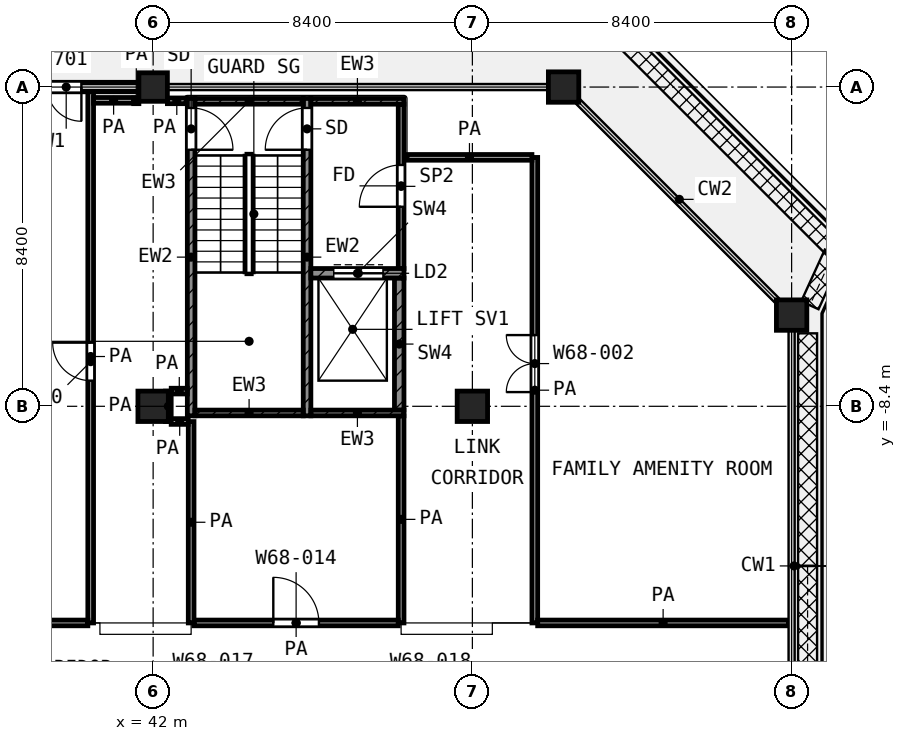
"""IFC4 building model, lengths in metres.
Left out: names, types, materials, properties, quantities, classifications, styles, units other than length and angle.
Written with IfcOpenShell. Run it as: python <this file> out.ifc"""

import sys

from ifc_helpers import new_model, si_unit, direction, frame, frame_2d, origin, origin_2d, place, context, subcontext, project, spatial, rectangle, extrude, element, fill, save


model = new_model("IFC4")
c1 = context("Model", 3, precision=1e-05, world=origin(), true_north=direction((0.0, 1.0)))
c2 = subcontext(c1, "Body", "Model", "MODEL_VIEW")
j1 = project(units=[si_unit("LENGTHUNIT", "METRE"), si_unit("PLANEANGLEUNIT", "RADIAN")], contexts=[c1])
p1 = place(None, origin())
s1 = spatial("IfcSite", under=j1, at=p1, CompositionType="ELEMENT")
p2 = place(p1, origin())
s2 = spatial("IfcBuilding", under=s1, at=p2, CompositionType="ELEMENT")
p3 = place(p2, frame((0.0, 0.0, 315.4)))
s3 = spatial("IfcBuildingStorey", under=s2, at=p3, CompositionType="ELEMENT", Elevation=315.4)
p4 = place(p3, frame((42.0, 0.0, 0.0), z_axis=(0.0, 0.0, 1.0), x_axis=(1.0, 0.0, 0.0)))
e1 = element("IfcColumn", 1, at=p4, inside=s3, PredefinedType="COLUMN", context=c2, shape_type="SweptSolid", body=[
    extrude(rectangle(XDim=0.75, YDim=0.75, at=origin_2d()), origin(), (0.0, 0.0, 1.0), 4.2),
])
for number, where, z_axis, x_axis in (
    (2, (52.8, 0.0, 0.0), (0.0, 0.0, 1.0), (1.0, 0.0, 0.0)),
    (3, (58.8, -6.0, 0.0), (0.0, 0.0, 1.0), (1.0, 0.0, 0.0)),
    (4, (42.0, -8.4, 0.0), (0.0, 0.0, 1.0), (1.0, 0.0, 0.0)),
    (5, (50.4, -8.4, 0.0), (0.0, 0.0, 1.0), (1.0, 0.0, 0.0)),
):
    element("IfcColumn", number, at=place(p3, frame(where, z_axis=z_axis, x_axis=x_axis)), inside=s3, PredefinedType="COLUMN", context=c2, shape_type="SweptSolid", body=[
        extrude(rectangle(XDim=0.8, YDim=0.8, at=origin_2d()), origin(), (0.0, 0.0, 1.0), 4.2),
    ])
p5 = place(p3, frame((41.625, 0.0, 0.0), z_axis=(0.0, 0.0, 1.0), x_axis=(-1.0, 0.0, 0.0)))
e6 = element("IfcWall", 6, at=p5, inside=s3, PredefinedType="SOLIDWALL", context=c2, shape_type="SweptSolid", body=[
    extrude(rectangle(XDim=3.825, YDim=0.25, at=frame_2d((1.913, 0.0))), origin(), (0.0, 0.0, 1.0), 3.48),
])
p6 = place(p5, frame((1.512, 0.0, 0.0)))
e7 = element("IfcOpeningElement", 7, at=p6, cuts=e6, PredefinedType="OPENING", context=c2, shape_type="SweptSolid", body=[
    extrude(rectangle(XDim=1.8, YDim=2.1, at=frame_2d((0.9, 1.05))), frame((0.0, 0.135, 0.0), z_axis=(0.0, -1.0, 0.0), x_axis=(1.0, 0.0, 0.0)), (0.0, 0.0, 1.0), 0.27),
])
p7 = place(p3, frame((43.0, -8.65, 0.0), z_axis=(0.0, 0.0, 1.0), x_axis=(0.0, 1.0, 0.0)))
e8 = element("IfcWall", 8, at=p7, inside=s3, PredefinedType="SHEAR", context=c2, shape_type="SweptSolid", body=[
    extrude(rectangle(XDim=8.35, YDim=0.2, at=frame_2d((4.175, 0.0))), origin(), (0.0, 0.0, 1.0), 3.6),
])
p8 = place(p7, frame((7.0, 0.0, 0.0)))
e9 = element("IfcOpeningElement", 9, at=p8, cuts=e8, PredefinedType="OPENING", context=c2, shape_type="SweptSolid", body=[
    extrude(rectangle(XDim=1.1, YDim=2.1, at=frame_2d((0.55, 1.05))), frame((0.0, 0.11, 0.0), z_axis=(0.0, -1.0, 0.0), x_axis=(1.0, 0.0, 0.0)), (0.0, 0.0, 1.0), 0.22),
])
p9 = place(p3, frame((46.05, -8.65, 0.0), z_axis=(0.0, 0.0, 1.0), x_axis=(0.0, 1.0, 0.0)))
e10 = element("IfcWall", 10, at=p9, inside=s3, PredefinedType="SHEAR", context=c2, shape_type="SweptSolid", body=[
    extrude(rectangle(XDim=8.35, YDim=0.2, at=frame_2d((4.175, 0.0))), origin(), (0.0, 0.0, 1.0), 3.6),
])
p10 = place(p9, frame((7.0, 0.0, 0.0)))
e11 = element("IfcOpeningElement", 11, at=p10, cuts=e10, PredefinedType="OPENING", context=c2, shape_type="SweptSolid", body=[
    extrude(rectangle(XDim=1.1, YDim=2.1, at=frame_2d((0.55, 1.05))), frame((0.0, 0.11, 0.0), z_axis=(0.0, -1.0, 0.0), x_axis=(1.0, 0.0, 0.0)), (0.0, 0.0, 1.0), 0.22),
])
p11 = place(p3, frame((43.1, -0.375, 0.0), z_axis=(0.0, 0.0, 1.0), x_axis=(1.0, 0.0, 0.0)))
e12 = element("IfcWall", 12, at=p11, inside=s3, PredefinedType="SHEAR", context=c2, shape_type="SweptSolid", body=[
    extrude(rectangle(XDim=2.85, YDim=0.15, at=frame_2d((1.425, 0.0))), origin(), (0.0, 0.0, 1.0), 3.6),
])
p12 = place(p3, frame((46.15, -0.375, 0.0), z_axis=(0.0, 0.0, 1.0), x_axis=(1.0, 0.0, 0.0)))
e13 = element("IfcWall", 13, at=p12, inside=s3, PredefinedType="SHEAR", context=c2, shape_type="SweptSolid", body=[
    extrude(rectangle(XDim=2.45, YDim=0.15, at=frame_2d((1.225, 0.0))), origin(), (0.0, 0.0, 1.0), 3.6),
])
p13 = place(p3, frame((43.1, -8.575, 0.0), z_axis=(0.0, 0.0, 1.0), x_axis=(1.0, 0.0, 0.0)))
e14 = element("IfcWall", 14, at=p13, inside=s3, PredefinedType="SHEAR", context=c2, shape_type="SweptSolid", body=[
    extrude(rectangle(XDim=2.85, YDim=0.15, at=frame_2d((1.425, 0.0))), origin(), (0.0, 0.0, 1.0), 3.6),
])
p14 = place(p3, frame((46.15, -8.575, 0.0), z_axis=(0.0, 0.0, 1.0), x_axis=(1.0, 0.0, 0.0)))
e15 = element("IfcWall", 15, at=p14, inside=s3, PredefinedType="SHEAR", context=c2, shape_type="SweptSolid", body=[
    extrude(rectangle(XDim=2.45, YDim=0.15, at=frame_2d((1.225, 0.0))), origin(), (0.0, 0.0, 1.0), 3.6),
])
p15 = place(p3, frame((46.15, -4.9, 0.0), z_axis=(0.0, 0.0, 1.0), x_axis=(1.0, 0.0, 0.0)))
e16 = element("IfcWall", 16, at=p15, inside=s3, PredefinedType="SHEAR", context=c2, shape_type="SweptSolid", body=[
    extrude(rectangle(XDim=2.45, YDim=0.25, at=frame_2d((1.225, 0.0))), origin(), (0.0, 0.0, 1.0), 3.6),
])
p16 = place(p15, frame((0.6, 0.0, 0.0)))
e17 = element("IfcOpeningElement", 17, at=p16, cuts=e16, PredefinedType="OPENING", context=c2, shape_type="SweptSolid", body=[
    extrude(rectangle(XDim=1.3, YDim=2.1, at=frame_2d((0.65, 1.05))), frame((0.0, 0.135, 0.0), z_axis=(0.0, -1.0, 0.0), x_axis=(1.0, 0.0, 0.0)), (0.0, 0.0, 1.0), 0.27),
])
p17 = place(p3, frame((48.475, -8.5, 0.0), z_axis=(0.0, 0.0, 1.0), x_axis=(0.0, 1.0, 0.0)))
e18 = element("IfcWall", 18, at=p17, inside=s3, PredefinedType="SHEAR", context=c2, shape_type="SweptSolid", body=[
    extrude(rectangle(XDim=3.475, YDim=0.25, at=frame_2d((1.738, 0.0))), origin(), (0.0, 0.0, 1.0), 3.6),
])
p18 = place(p3, frame((48.525, -4.775, 0.0), z_axis=(0.0, 0.0, 1.0), x_axis=(0.0, 1.0, 0.0)))
e19 = element("IfcWall", 19, at=p18, inside=s3, PredefinedType="PARTITIONING", context=c2, shape_type="SweptSolid", body=[
    extrude(rectangle(XDim=4.325, YDim=0.15, at=frame_2d((2.163, 0.0))), origin(), (0.0, 0.0, 1.0), 3.6),
])
p19 = place(p18, frame((1.625, 0.0, 0.0)))
e20 = element("IfcOpeningElement", 20, at=p19, cuts=e19, PredefinedType="OPENING", context=c2, shape_type="SweptSolid", body=[
    extrude(rectangle(XDim=1.1, YDim=2.1, at=frame_2d((0.55, 1.05))), frame((0.0, 0.085, 0.0), z_axis=(0.0, -1.0, 0.0), x_axis=(1.0, 0.0, 0.0)), (0.0, 0.0, 1.0), 0.17),
])
p20 = place(p3, frame((29.475, -14.1, 0.0), z_axis=(0.0, 0.0, 1.0), x_axis=(1.0, 0.0, 0.0)))
e21 = element("IfcWall", 21, at=p20, inside=s3, PredefinedType="PARTITIONING", context=c2, shape_type="SweptSolid", body=[
    extrude(rectangle(XDim=10.807, YDim=0.15, at=frame_2d((5.403, 0.0))), origin(), (0.0, 0.0, 1.0), 3.6),
])
p21 = place(p20, frame((1.425, 0.0, 0.0)))
e22 = element("IfcOpeningElement", 22, at=p21, cuts=e21, PredefinedType="OPENING", context=c2, shape_type="SweptSolid", body=[
    extrude(rectangle(XDim=1.2, YDim=2.1, at=frame_2d((0.6, 1.05))), frame((0.0, 0.085, 0.0), z_axis=(0.0, -1.0, 0.0), x_axis=(1.0, 0.0, 0.0)), (0.0, 0.0, 1.0), 0.17),
])
p22 = place(p3, frame((43.075, -14.1, 0.0), z_axis=(0.0, 0.0, 1.0), x_axis=(1.0, 0.0, 0.0)))
e23 = element("IfcWall", 23, at=p22, inside=s3, PredefinedType="PARTITIONING", context=c2, shape_type="SweptSolid", body=[
    extrude(rectangle(XDim=5.375, YDim=0.15, at=frame_2d((2.688, 0.0))), origin(), (0.0, 0.0, 1.0), 3.6),
])
p23 = place(p22, frame((2.087, 0.0, 0.0)))
e24 = element("IfcOpeningElement", 24, at=p23, cuts=e23, PredefinedType="OPENING", context=c2, shape_type="SweptSolid", body=[
    extrude(rectangle(XDim=1.2, YDim=2.1, at=frame_2d((0.6, 1.05))), frame((0.0, 0.085, 0.0), z_axis=(0.0, -1.0, 0.0), x_axis=(1.0, 0.0, 0.0)), (0.0, 0.0, 1.0), 0.17),
])
p24 = place(p3, frame((52.118, -14.1, 0.0), z_axis=(0.0, 0.0, 1.0), x_axis=(1.0, 0.0, 0.0)))
e25 = element("IfcWall", 25, at=p24, inside=s3, PredefinedType="PARTITIONING", context=c2, shape_type="SweptSolid", body=[
    extrude(rectangle(XDim=6.602, YDim=0.15, at=frame_2d((3.301, 0.0))), origin(), (0.0, 0.0, 1.0), 3.6),
])
p25 = place(p3, frame((42.475, -8.8, 0.0), z_axis=(0.0, 0.0, 1.0), x_axis=(1.0, 0.0, 0.0)))
e26 = element("IfcWall", 26, at=p25, inside=s3, PredefinedType="PARTITIONING", context=c2, shape_type="SweptSolid", body=[
    extrude(rectangle(XDim=0.448, YDim=0.15, at=frame_2d((0.224, 0.0))), origin(), (0.0, 0.0, 1.0), 3.6),
])
p26 = place(p3, frame((42.476, -8.0, 0.0), z_axis=(0.0, 0.0, 1.0), x_axis=(1.0, 0.0, 0.0)))
e27 = element("IfcWall", 27, at=p26, inside=s3, PredefinedType="PARTITIONING", context=c2, shape_type="SweptSolid", body=[
    extrude(rectangle(XDim=0.424, YDim=0.15, at=frame_2d((0.212, 0.0))), origin(), (0.0, 0.0, 1.0), 3.6),
])
p27 = place(p3, frame((48.68, -1.85, 0.0), z_axis=(0.0, 0.0, 1.0), x_axis=(1.0, 0.0, 0.0)))
e28 = element("IfcWall", 28, at=p27, inside=s3, PredefinedType="PARTITIONING", context=c2, shape_type="SweptSolid", body=[
    extrude(rectangle(XDim=3.287, YDim=0.15, at=frame_2d((1.644, 0.0))), origin(), (0.0, 0.0, 1.0), 3.6),
])
p28 = place(p3, frame((41.488, -0.362, 0.0), z_axis=(0.0, 0.0, 1.0), x_axis=(1.0, 0.0, 0.0)))
e29 = element("IfcWall", 29, at=p28, inside=s3, PredefinedType="PARTITIONING", context=c2, shape_type="SweptSolid", body=[
    extrude(rectangle(XDim=0.137, YDim=0.15, at=frame_2d((0.068, 0.0))), origin(), (0.0, 0.0, 1.0), 3.6),
])
p29 = place(p3, frame((42.375, -0.362, 0.0), z_axis=(0.0, 0.0, 1.0), x_axis=(1.0, 0.0, 0.0)))
e30 = element("IfcWall", 30, at=p29, inside=s3, PredefinedType="PARTITIONING", context=c2, shape_type="SweptSolid", body=[
    extrude(rectangle(XDim=0.495, YDim=0.15, at=frame_2d((0.248, 0.0))), origin(), (0.0, 0.0, 1.0), 3.6),
])
p30 = place(p3, frame((40.432, -0.35, 0.0), z_axis=(0.0, 0.0, 1.0), x_axis=(1.0, 0.0, 0.0)))
e31 = element("IfcWall", 31, at=p30, inside=s3, PredefinedType="PARTITIONING", context=c2, shape_type="SweptSolid", body=[
    extrude(rectangle(XDim=1.056, YDim=0.15, at=frame_2d((0.528, 0.0))), origin(), (0.0, 0.0, 1.0), 3.6),
])
p31 = place(p3, frame((40.357, -14.1, 0.0), z_axis=(0.0, 0.0, 1.0), x_axis=(0.0, 1.0, 0.0)))
e32 = element("IfcWall", 32, at=p31, inside=s3, PredefinedType="PARTITIONING", context=c2, shape_type="SweptSolid", body=[
    extrude(rectangle(XDim=14.02, YDim=0.15, at=frame_2d((7.01, 0.0))), origin(), (0.0, 0.0, 1.0), 3.6),
])
p32 = place(p31, frame((6.375, 0.0, 0.0)))
e33 = element("IfcOpeningElement", 33, at=p32, cuts=e32, PredefinedType="OPENING", context=c2, shape_type="SweptSolid", body=[
    extrude(rectangle(XDim=1.0, YDim=2.1, at=frame_2d((0.5, 1.05))), frame((0.0, 0.085, 0.0), z_axis=(0.0, -1.0, 0.0), x_axis=(1.0, 0.0, 0.0)), (0.0, 0.0, 1.0), 0.17),
])
p33 = place(p3, frame((42.4, -8.8, 0.0), z_axis=(0.0, 0.0, 1.0), x_axis=(0.0, 1.0, 0.0)))
e34 = element("IfcWall", 34, at=p33, inside=s3, PredefinedType="PARTITIONING", context=c2, shape_type="SweptSolid", body=[
    extrude(rectangle(XDim=0.799, YDim=0.15, at=frame_2d((0.399, 0.0))), origin(), (0.0, 0.0, 1.0), 3.6),
])
p34 = place(p3, frame((43.0, -14.1, 0.0), z_axis=(0.0, 0.0, 1.0), x_axis=(0.0, 1.0, 0.0)))
e35 = element("IfcWall", 35, at=p34, inside=s3, PredefinedType="PARTITIONING", context=c2, shape_type="SweptSolid", body=[
    extrude(rectangle(XDim=5.298, YDim=0.15, at=frame_2d((2.649, 0.0))), origin(), (0.0, 0.0, 1.0), 3.6),
])
p35 = place(p3, frame((48.525, -14.1, 0.0), z_axis=(0.0, 0.0, 1.0), x_axis=(0.0, 1.0, 0.0)))
e36 = element("IfcWall", 36, at=p35, inside=s3, PredefinedType="PARTITIONING", context=c2, shape_type="SweptSolid", body=[
    extrude(rectangle(XDim=5.45, YDim=0.15, at=frame_2d((2.725, 0.0))), origin(), (0.0, 0.0, 1.0), 3.6),
])
p36 = place(p3, frame((52.043, -14.1, 0.0), z_axis=(0.0, 0.0, 1.0), x_axis=(0.0, 1.0, 0.0)))
e37 = element("IfcWall", 37, at=p36, inside=s3, PredefinedType="PARTITIONING", context=c2, shape_type="SweptSolid", body=[
    extrude(rectangle(XDim=12.248, YDim=0.15, at=frame_2d((6.124, 0.0))), origin(), (0.0, 0.0, 1.0), 3.6),
])
p37 = place(p36, frame((6.074, 0.0, 0.0)))
e38 = element("IfcOpeningElement", 38, at=p37, cuts=e37, PredefinedType="OPENING", context=c2, shape_type="SweptSolid", body=[
    extrude(rectangle(XDim=1.5, YDim=2.1, at=frame_2d((0.75, 1.05))), frame((0.0, 0.085, 0.0), z_axis=(0.0, -1.0, 0.0), x_axis=(1.0, 0.0, 0.0)), (0.0, 0.0, 1.0), 0.17),
])
p38 = place(p6, origin())
e39 = element("IfcDoor", 39, at=p38, inside=s3, OperationType="DOUBLE_DOOR_SINGLE_SWING", PredefinedType="DOOR", context=c2, shape_type="SweptSolid", body=[
    extrude(rectangle(XDim=1.8, YDim=2.1, at=frame_2d((0.9, 1.05))), frame((0.0, 0.025, 0.0), z_axis=(0.0, -1.0, 0.0), x_axis=(1.0, 0.0, 0.0)), (0.0, 0.0, 1.0), 0.05),
])
fill(e7, e39)
p39 = place(p8, frame((1.1, 0.0, 0.0), z_axis=(0.0, 0.0, 1.0), x_axis=(-1.0, 0.0, 0.0)))
e40 = element("IfcDoor", 40, at=p39, inside=s3, OperationType="SINGLE_SWING_LEFT", PredefinedType="DOOR", context=c2, shape_type="SweptSolid", body=[
    extrude(rectangle(XDim=1.1, YDim=2.1, at=frame_2d((0.55, 1.05))), frame((0.0, 0.025, 0.0), z_axis=(0.0, -1.0, 0.0), x_axis=(1.0, 0.0, 0.0)), (0.0, 0.0, 1.0), 0.05),
])
fill(e9, e40)
p40 = place(p10, origin())
e41 = element("IfcDoor", 41, at=p40, inside=s3, OperationType="SINGLE_SWING_LEFT", PredefinedType="DOOR", context=c2, shape_type="SweptSolid", body=[
    extrude(rectangle(XDim=1.1, YDim=2.1, at=frame_2d((0.55, 1.05))), frame((0.0, 0.025, 0.0), z_axis=(0.0, -1.0, 0.0), x_axis=(1.0, 0.0, 0.0)), (0.0, 0.0, 1.0), 0.05),
])
fill(e11, e41)
p41 = place(p16, origin())
e42 = element("IfcDoor", 42, at=p41, inside=s3, OperationType="DOUBLE_DOOR_SLIDING", PredefinedType="DOOR", context=c2, shape_type="SweptSolid", body=[
    extrude(rectangle(XDim=1.3, YDim=2.1, at=frame_2d((0.65, 1.05))), frame((0.0, 0.025, 0.0), z_axis=(0.0, -1.0, 0.0), x_axis=(1.0, 0.0, 0.0)), (0.0, 0.0, 1.0), 0.05),
])
fill(e17, e42)
p42 = place(p19, origin())
e43 = element("IfcDoor", 43, at=p42, inside=s3, OperationType="SINGLE_SWING_LEFT", PredefinedType="DOOR", context=c2, shape_type="SweptSolid", body=[
    extrude(rectangle(XDim=1.1, YDim=2.1, at=frame_2d((0.55, 1.05))), frame((0.0, 0.025, 0.0), z_axis=(0.0, -1.0, 0.0), x_axis=(1.0, 0.0, 0.0)), (0.0, 0.0, 1.0), 0.05),
])
fill(e20, e43)
p43 = place(p32, origin())
e44 = element("IfcDoor", 44, at=p43, inside=s3, OperationType="SINGLE_SWING_RIGHT", PredefinedType="DOOR", context=c2, shape_type="SweptSolid", body=[
    extrude(rectangle(XDim=1.0, YDim=2.1, at=frame_2d((0.5, 1.05))), frame((0.0, 0.025, 0.0), z_axis=(0.0, -1.0, 0.0), x_axis=(1.0, 0.0, 0.0)), (0.0, 0.0, 1.0), 0.05),
])
fill(e33, e44)
p44 = place(p23, origin())
e45 = element("IfcDoor", 45, at=p44, inside=s3, OperationType="SINGLE_SWING_LEFT", PredefinedType="DOOR", context=c2, shape_type="SweptSolid", body=[
    extrude(rectangle(XDim=1.2, YDim=2.1, at=frame_2d((0.6, 1.05))), frame((0.0, 0.025, 0.0), z_axis=(0.0, -1.0, 0.0), x_axis=(1.0, 0.0, 0.0)), (0.0, 0.0, 1.0), 0.05),
])
fill(e24, e45)
p45 = place(p37, origin())
e46 = element("IfcDoor", 46, at=p45, inside=s3, OperationType="DOUBLE_DOOR_SINGLE_SWING", PredefinedType="DOOR", context=c2, shape_type="SweptSolid", body=[
    extrude(rectangle(XDim=1.5, YDim=2.1, at=frame_2d((0.75, 1.05))), frame((0.0, 0.025, 0.0), z_axis=(0.0, -1.0, 0.0), x_axis=(1.0, 0.0, 0.0)), (0.0, 0.0, 1.0), 0.05),
])
fill(e38, e46)
save(model, sys.argv[1])
